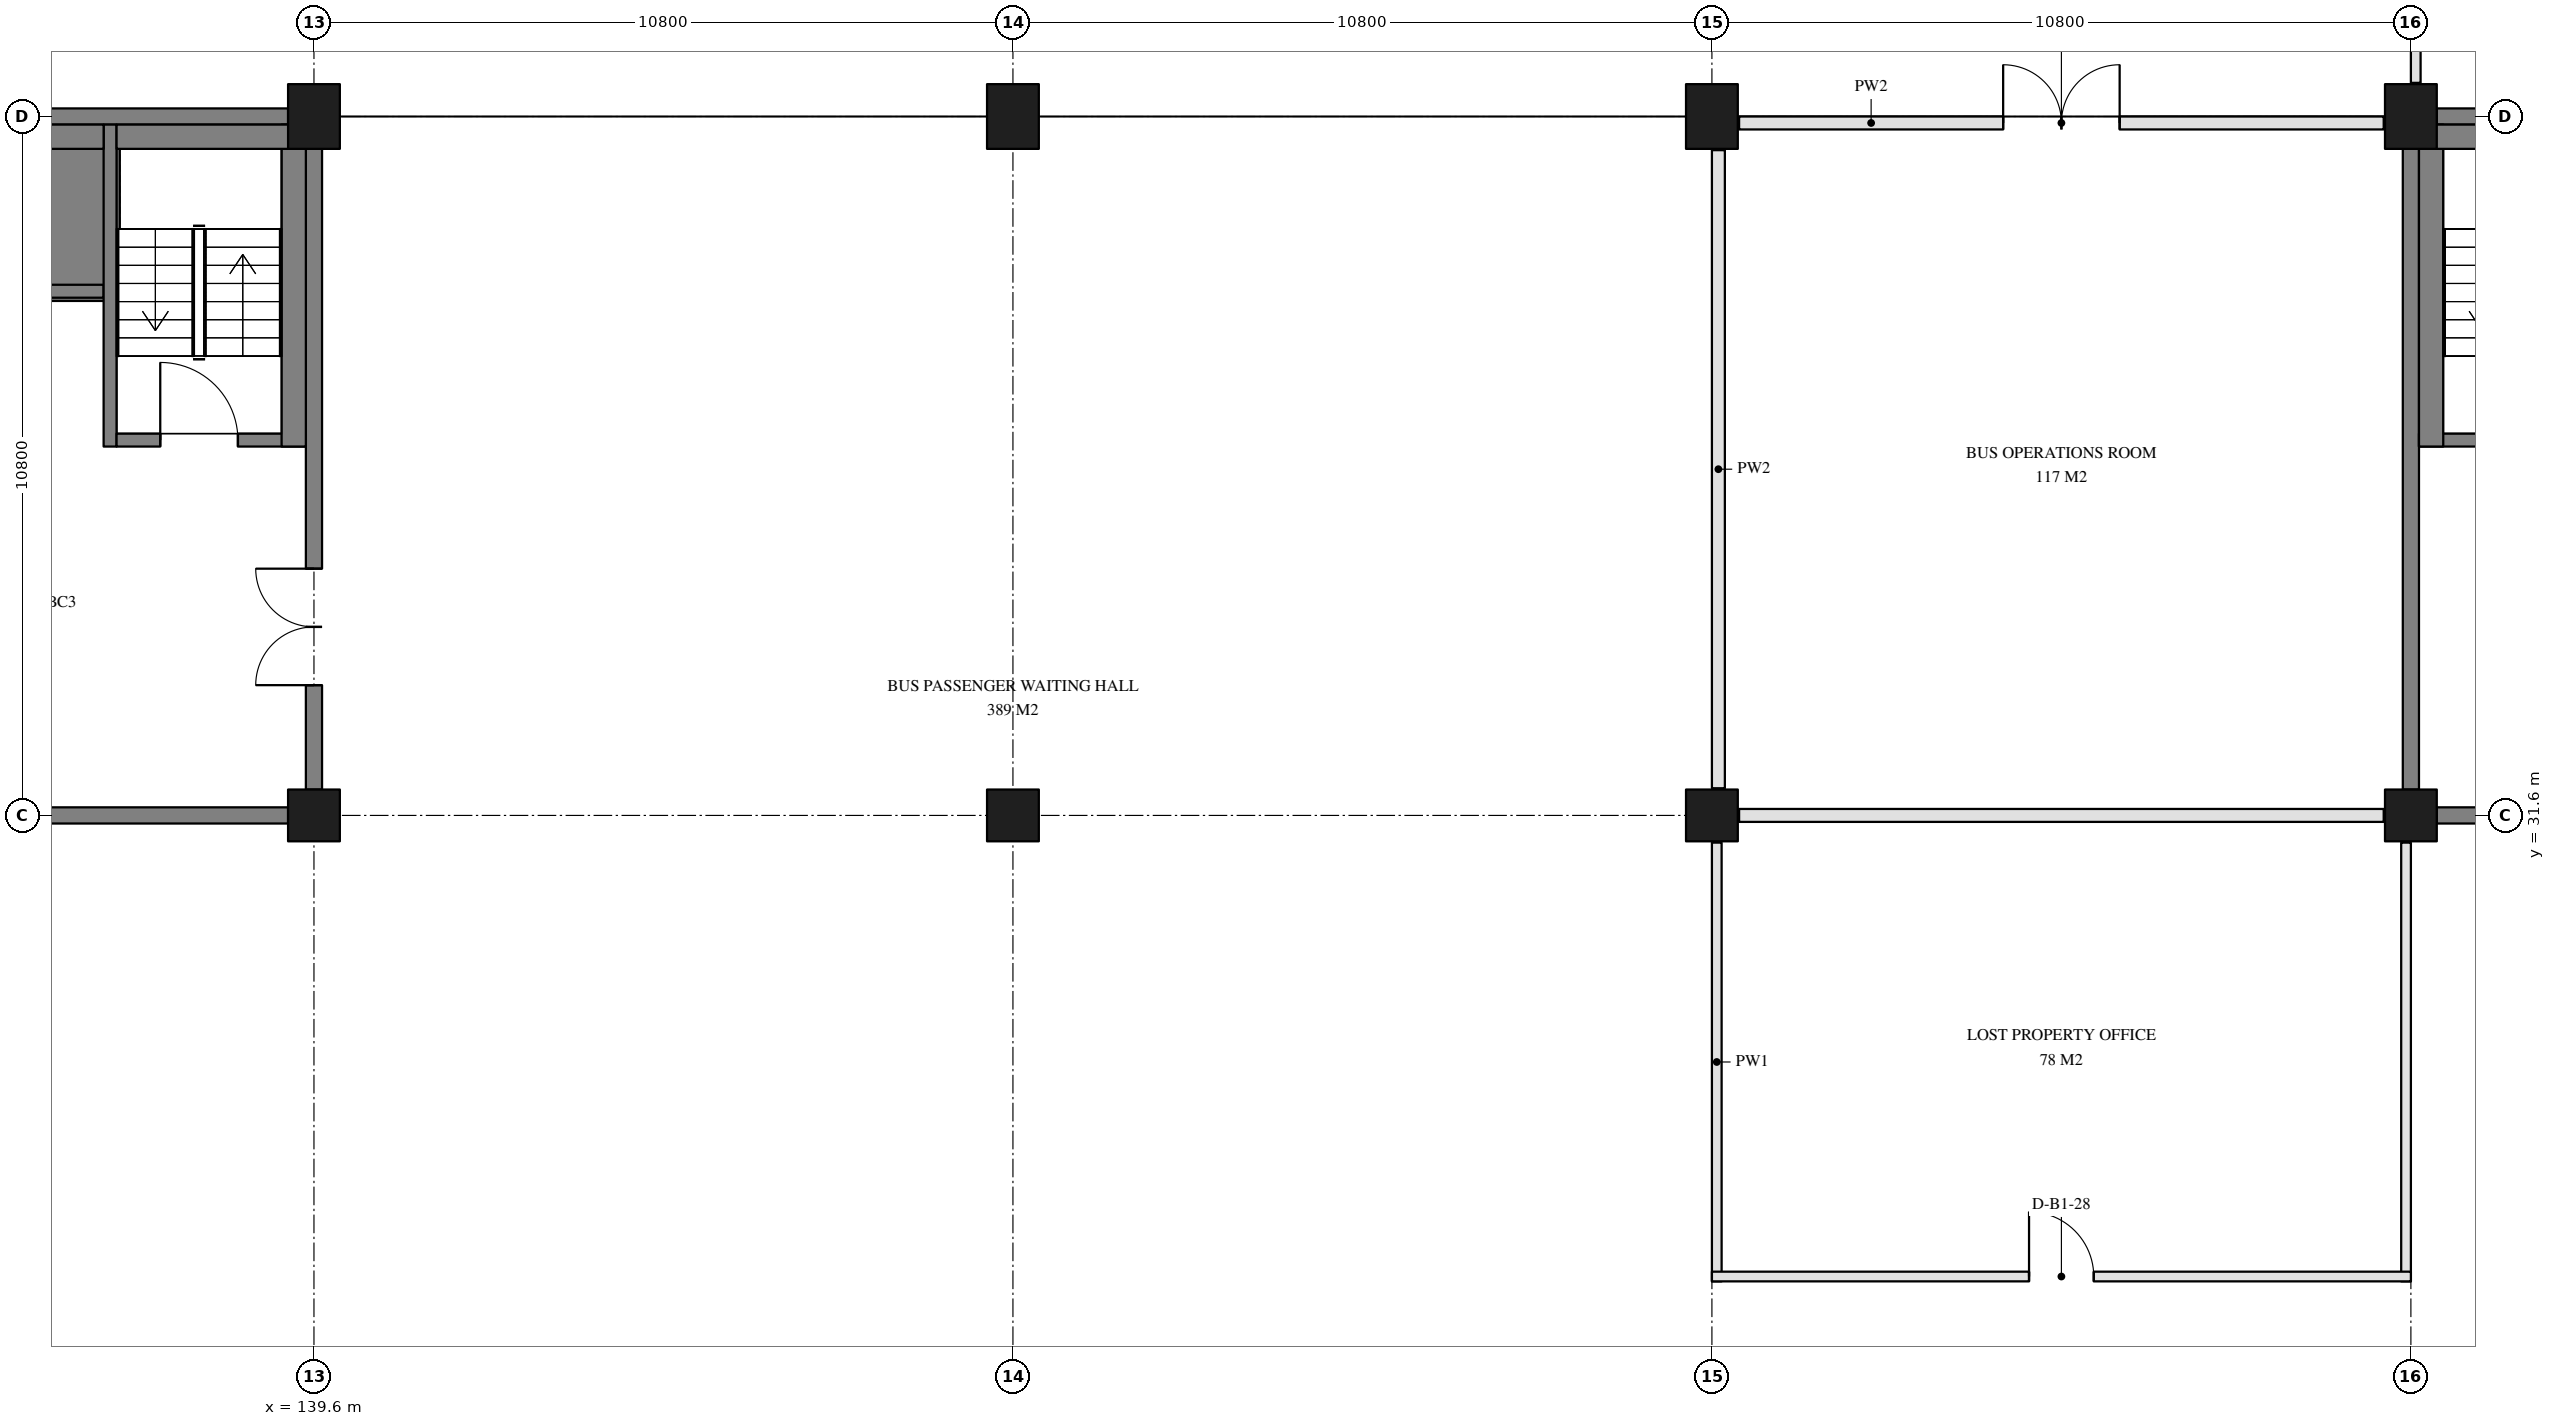
"""IFC4 building model, lengths in metres.
Left out: names, types, materials, properties, quantities, classifications, styles, units other than length and angle.
Written with IfcOpenShell. Run it as: python <this file> out.ifc"""

import sys

from ifc_helpers import new_model, si_unit, direction, frame, frame_2d, origin, origin_2d, place, context, subcontext, project, spatial, polyline, rectangle, outline, extrude, element, fill, save


model = new_model("IFC4")
c1 = context("Model", 3, precision=1e-05, world=origin(), true_north=direction((0.0, 1.0)))
c2 = subcontext(c1, "Body", "Model", "MODEL_VIEW")
j1 = project(units=[si_unit("LENGTHUNIT", "METRE"), si_unit("PLANEANGLEUNIT", "RADIAN")], contexts=[c1])
p1 = place(None, origin())
s1 = spatial("IfcSite", under=j1, at=p1, CompositionType="ELEMENT")
p2 = place(p1, origin())
s2 = spatial("IfcBuilding", under=s1, at=p2, CompositionType="ELEMENT")
p3 = place(p2, frame((0.0, 0.0, -5.4)))
s3 = spatial("IfcBuildingStorey", under=s2, at=p3, CompositionType="ELEMENT", Elevation=-5.4)
for number, where, z_axis, x_axis in (
    (1, (139.6, 42.4, -0.4), (0.0, 0.0, 1.0), (1.0, 0.0, 0.0)),
    (2, (150.4, 42.4, -0.4), (0.0, 0.0, 1.0), (1.0, 0.0, 0.0)),
    (3, (161.2, 42.4, -0.4), (0.0, 0.0, 1.0), (1.0, 0.0, 0.0)),
    (4, (172.0, 42.4, -0.4), (0.0, 0.0, 1.0), (1.0, 0.0, 0.0)),
):
    element("IfcColumn", number, at=place(p3, frame(where, z_axis=z_axis, x_axis=x_axis)), inside=s3, PredefinedType="COLUMN", context=c2, shape_type="SweptSolid", body=[
        extrude(rectangle(XDim=0.8, YDim=1.0, at=origin_2d()), origin(), (0.0, 0.0, 1.0), 5.8),
    ])
for number, where, z_axis, x_axis in (
    (5, (139.6, 31.6, -0.4), (0.0, 0.0, 1.0), (1.0, 0.0, 0.0)),
    (6, (150.4, 31.6, -0.4), (0.0, 0.0, 1.0), (1.0, 0.0, 0.0)),
    (7, (161.2, 31.6, -0.4), (0.0, 0.0, 1.0), (1.0, 0.0, 0.0)),
    (8, (172.0, 31.6, -0.4), (0.0, 0.0, 1.0), (1.0, 0.0, 0.0)),
):
    element("IfcColumn", number, at=place(p3, frame(where, z_axis=z_axis, x_axis=x_axis)), inside=s3, PredefinedType="COLUMN", context=c2, shape_type="SweptSolid", body=[
        extrude(rectangle(XDim=0.8, YDim=0.8, at=origin_2d()), origin(), (0.0, 0.0, 1.0), 5.8),
    ])
p4 = place(p3, frame((0.0, 0.0, -1.4)))
e9 = element("IfcWall", 9, at=p4, inside=s3, PredefinedType="SOLIDWALL", context=c2, shape_type="SweptSolid", body=[
    extrude(outline(polyline([(131.8, 39.55), (136.6, 39.55), (136.6, 42.15), (131.8, 42.15), (131.8, 39.55)]), holes=[polyline([(136.35, 39.8), (136.35, 41.9), (132.05, 41.9), (132.05, 39.8), (136.35, 39.8)])]), origin(), (0.0, 0.0, 1.0), 1.4),
])
p5 = place(p3, frame((129.2, 31.6, 0.0), z_axis=(0.0, 0.0, 1.0), x_axis=(1.0, 0.0, 0.0)))
e10 = element("IfcWall", 10, at=p5, inside=s3, PredefinedType="SOLIDWALL", context=c2, shape_type="SweptSolid", body=[
    extrude(rectangle(XDim=10.0, YDim=0.25, at=frame_2d((5.0, 0.0))), origin(), (0.0, 0.0, 1.0), 5.4),
])
p6 = place(p5, frame((4.1, 0.0, 0.0)))
e11 = element("IfcOpeningElement", 11, at=p6, cuts=e10, PredefinedType="OPENING", context=c2, shape_type="SweptSolid", body=[
    extrude(rectangle(XDim=1.8, YDim=2.1, at=frame_2d((0.9, 1.05))), frame((0.0, 0.135, 0.0), z_axis=(0.0, -1.0, 0.0), x_axis=(1.0, 0.0, 0.0)), (0.0, 0.0, 1.0), 0.27),
])
p7 = place(p3, frame((139.6, 32.0, 0.0), z_axis=(0.0, 0.0, 1.0), x_axis=(0.0, 1.0, 0.0)))
e12 = element("IfcWall", 12, at=p7, inside=s3, PredefinedType="SOLIDWALL", context=c2, shape_type="SweptSolid", body=[
    extrude(rectangle(XDim=9.9, YDim=0.25, at=frame_2d((4.95, 0.0))), origin(), (0.0, 0.0, 1.0), 5.4),
])
p8 = place(p7, frame((1.613, 0.0, 0.0)))
e13 = element("IfcOpeningElement", 13, at=p8, cuts=e12, PredefinedType="OPENING", context=c2, shape_type="SweptSolid", body=[
    extrude(rectangle(XDim=1.8, YDim=2.1, at=frame_2d((0.9, 1.05))), frame((0.0, 0.135, 0.0), z_axis=(0.0, -1.0, 0.0), x_axis=(1.0, 0.0, 0.0)), (0.0, 0.0, 1.0), 0.27),
])
p9 = place(p3, frame((139.2, 42.4, 0.0), z_axis=(0.0, 0.0, 1.0), x_axis=(-1.0, 0.0, 0.0)))
e14 = element("IfcWall", 14, at=p9, inside=s3, PredefinedType="SOLIDWALL", context=c2, shape_type="SweptSolid", body=[
    extrude(rectangle(XDim=10.0, YDim=0.25, at=frame_2d((5.0, 0.0))), origin(), (0.0, 0.0, 1.0), 5.4),
])
p10 = place(p3, frame((172.4, 31.6, 0.0), z_axis=(0.0, 0.0, 1.0), x_axis=(1.0, 0.0, 0.0)))
e15 = element("IfcWall", 15, at=p10, inside=s3, PredefinedType="SOLIDWALL", context=c2, shape_type="SweptSolid", body=[
    extrude(rectangle(XDim=10.0, YDim=0.25, at=frame_2d((5.0, 0.0))), origin(), (0.0, 0.0, 1.0), 5.4),
])
p11 = place(p10, frame((4.1, 0.0, 0.0)))
e16 = element("IfcOpeningElement", 16, at=p11, cuts=e15, PredefinedType="OPENING", context=c2, shape_type="SweptSolid", body=[
    extrude(rectangle(XDim=1.8, YDim=2.1, at=frame_2d((0.9, 1.05))), frame((0.0, 0.135, 0.0), z_axis=(0.0, -1.0, 0.0), x_axis=(1.0, 0.0, 0.0)), (0.0, 0.0, 1.0), 0.27),
])
p12 = place(p3, frame((182.4, 42.4, 0.0), z_axis=(0.0, 0.0, 1.0), x_axis=(-1.0, 0.0, 0.0)))
e17 = element("IfcWall", 17, at=p12, inside=s3, PredefinedType="SOLIDWALL", context=c2, shape_type="SweptSolid", body=[
    extrude(rectangle(XDim=10.0, YDim=0.25, at=frame_2d((5.0, 0.0))), origin(), (0.0, 0.0, 1.0), 5.4),
])
p13 = place(p3, frame((172.0, 41.9, 0.0), z_axis=(0.0, 0.0, 1.0), x_axis=(0.0, -1.0, 0.0)))
e18 = element("IfcWall", 18, at=p13, inside=s3, PredefinedType="SOLIDWALL", context=c2, shape_type="SweptSolid", body=[
    extrude(rectangle(XDim=9.9, YDim=0.25, at=frame_2d((4.95, 0.0))), origin(), (0.0, 0.0, 1.0), 5.4),
])
p14 = place(p3, frame((132.05, 39.7, 0.0), z_axis=(0.0, 0.0, 1.0), x_axis=(1.0, 0.0, 0.0)))
e19 = element("IfcWall", 19, at=p14, inside=s3, PredefinedType="SOLIDWALL", context=c2, shape_type="SweptSolid", body=[
    extrude(rectangle(XDim=4.3, YDim=0.2, at=frame_2d((2.15, 0.0))), origin(), (0.0, 0.0, 1.0), 4.8),
])
p15 = place(p14, frame((1.6, 0.0, 0.0)))
e20 = element("IfcOpeningElement", 20, at=p15, cuts=e19, PredefinedType="OPENING", context=c2, shape_type="SweptSolid", body=[
    extrude(rectangle(XDim=1.1, YDim=2.1, at=frame_2d((0.55, 1.05))), frame((0.0, 0.11, 0.0), z_axis=(0.0, -1.0, 0.0), x_axis=(1.0, 0.0, 0.0)), (0.0, 0.0, 1.0), 0.22),
])
p16 = place(p3, frame((136.45, 37.3, 0.0), z_axis=(0.0, 0.0, 1.0), x_axis=(0.0, 1.0, 0.0)))
e21 = element("IfcWall", 21, at=p16, inside=s3, PredefinedType="SOLIDWALL", context=c2, shape_type="SweptSolid", body=[
    extrude(rectangle(XDim=4.975, YDim=0.2, at=frame_2d((2.487, 0.0))), origin(), (0.0, 0.0, 1.0), 4.8),
])
p17 = place(p3, frame((136.55, 37.4, 0.0), z_axis=(0.0, 0.0, 1.0), x_axis=(1.0, 0.0, 0.0)))
e22 = element("IfcWall", 22, at=p17, inside=s3, PredefinedType="SOLIDWALL", context=c2, shape_type="SweptSolid", body=[
    extrude(rectangle(XDim=2.925, YDim=0.2, at=frame_2d((1.462, 0.0))), origin(), (0.0, 0.0, 1.0), 4.8),
])
p18 = place(p17, frame((0.675, 0.0, 0.0)))
e23 = element("IfcOpeningElement", 23, at=p18, cuts=e22, PredefinedType="OPENING", context=c2, shape_type="SweptSolid", body=[
    extrude(rectangle(XDim=1.2, YDim=2.1, at=frame_2d((0.6, 1.05))), frame((0.0, 0.11, 0.0), z_axis=(0.0, -1.0, 0.0), x_axis=(1.0, 0.0, 0.0)), (0.0, 0.0, 1.0), 0.22),
])
p19 = place(p3, frame((139.288, 37.3, 0.0), z_axis=(0.0, 0.0, 1.0), x_axis=(0.0, 1.0, 0.0)))
e24 = element("IfcWall", 24, at=p19, inside=s3, PredefinedType="SOLIDWALL", context=c2, shape_type="SweptSolid", body=[
    extrude(rectangle(XDim=4.975, YDim=0.375, at=frame_2d((2.487, 0.0))), origin(), (0.0, 0.0, 1.0), 4.8),
])
p20 = place(p3, frame((136.55, 42.087, 0.0), z_axis=(0.0, 0.0, 1.0), x_axis=(1.0, 0.0, 0.0)))
e25 = element("IfcWall", 25, at=p20, inside=s3, PredefinedType="SOLIDWALL", context=c2, shape_type="SweptSolid", body=[
    extrude(rectangle(XDim=2.925, YDim=0.375, at=frame_2d((1.462, 0.0))), origin(), (0.0, 0.0, 1.0), 4.8),
])
p21 = place(p3, frame((132.05, 42.087, 0.0), z_axis=(0.0, 0.0, 1.0), x_axis=(1.0, 0.0, 0.0)))
e26 = element("IfcWall", 26, at=p21, inside=s3, PredefinedType="SOLIDWALL", context=c2, shape_type="SweptSolid", body=[
    extrude(rectangle(XDim=4.3, YDim=0.375, at=frame_2d((2.15, 0.0))), origin(), (0.0, 0.0, 1.0), 4.8),
])
p22 = place(p3, frame((172.125, 37.4, 0.0), z_axis=(0.0, 0.0, 1.0), x_axis=(1.0, 0.0, 0.0)))
e27 = element("IfcWall", 27, at=p22, inside=s3, PredefinedType="SOLIDWALL", context=c2, shape_type="SweptSolid", body=[
    extrude(rectangle(XDim=2.925, YDim=0.2, at=frame_2d((1.462, 0.0))), origin(), (0.0, 0.0, 1.0), 4.8),
])
p23 = place(p22, frame((1.05, 0.0, 0.0)))
e28 = element("IfcOpeningElement", 28, at=p23, cuts=e27, PredefinedType="OPENING", context=c2, shape_type="SweptSolid", body=[
    extrude(rectangle(XDim=1.2, YDim=2.1, at=frame_2d((0.6, 1.05))), frame((0.0, 0.11, 0.0), z_axis=(0.0, -1.0, 0.0), x_axis=(1.0, 0.0, 0.0)), (0.0, 0.0, 1.0), 0.22),
])
p24 = place(p3, frame((172.312, 37.3, 0.0), z_axis=(0.0, 0.0, 1.0), x_axis=(0.0, 1.0, 0.0)))
e29 = element("IfcWall", 29, at=p24, inside=s3, PredefinedType="SOLIDWALL", context=c2, shape_type="SweptSolid", body=[
    extrude(rectangle(XDim=4.975, YDim=0.375, at=frame_2d((2.487, 0.0))), origin(), (0.0, 0.0, 1.0), 4.8),
])
p25 = place(p3, frame((172.125, 42.087, 0.0), z_axis=(0.0, 0.0, 1.0), x_axis=(1.0, 0.0, 0.0)))
e30 = element("IfcWall", 30, at=p25, inside=s3, PredefinedType="SOLIDWALL", context=c2, shape_type="SweptSolid", body=[
    extrude(rectangle(XDim=2.925, YDim=0.375, at=frame_2d((1.462, 0.0))), origin(), (0.0, 0.0, 1.0), 4.8),
])
p26 = place(p3, frame((172.075, 42.92, 0.0), z_axis=(0.0, 0.0, 1.0), x_axis=(0.0, 1.0, 0.0)))
e31 = element("IfcWall", 31, at=p26, inside=s3, PredefinedType="PARTITIONING", context=c2, shape_type="SweptSolid", body=[
    extrude(rectangle(XDim=9.76, YDim=0.15, at=frame_2d((4.88, 0.0))), origin(), (0.0, 0.0, 1.0), 3.8),
])
p27 = place(p26, frame((3.98, 0.0, 0.0)))
e32 = element("IfcOpeningElement", 32, at=p27, cuts=e31, PredefinedType="OPENING", context=c2, shape_type="SweptSolid", body=[
    extrude(rectangle(XDim=1.8, YDim=2.1, at=frame_2d((0.9, 1.05))), frame((0.0, 0.085, 0.0), z_axis=(0.0, -1.0, 0.0), x_axis=(1.0, 0.0, 0.0)), (0.0, 0.0, 1.0), 0.17),
])
p28 = place(p3, frame((161.62, 42.3, 0.0), z_axis=(0.0, 0.0, 1.0), x_axis=(1.0, 0.0, 0.0)))
e33 = element("IfcWall", 33, at=p28, inside=s3, PredefinedType="PARTITIONING", context=c2, shape_type="SweptSolid", body=[
    extrude(rectangle(XDim=9.96, YDim=0.2, at=frame_2d((4.98, 0.0))), origin(), (0.0, 0.0, 1.0), 3.8),
])
p29 = place(p28, frame((4.08, 0.0, 0.0)))
e34 = element("IfcOpeningElement", 34, at=p29, cuts=e33, PredefinedType="OPENING", context=c2, shape_type="SweptSolid", body=[
    extrude(rectangle(XDim=1.8, YDim=2.1, at=frame_2d((0.9, 1.05))), frame((0.0, 0.11, 0.0), z_axis=(0.0, -1.0, 0.0), x_axis=(1.0, 0.0, 0.0)), (0.0, 0.0, 1.0), 0.22),
])
p30 = place(p3, frame((161.275, 24.4, 0.0), z_axis=(0.0, 0.0, 1.0), x_axis=(0.0, 1.0, 0.0)))
e35 = element("IfcWall", 35, at=p30, inside=s3, PredefinedType="PARTITIONING", context=c2, shape_type="SweptSolid", body=[
    extrude(rectangle(XDim=6.78, YDim=0.15, at=frame_2d((3.39, 0.0))), origin(), (0.0, 0.0, 1.0), 3.8),
])
p31 = place(p3, frame((161.3, 32.02, 0.0), z_axis=(0.0, 0.0, 1.0), x_axis=(0.0, 1.0, 0.0)))
e36 = element("IfcWall", 36, at=p31, inside=s3, PredefinedType="PARTITIONING", context=c2, shape_type="SweptSolid", body=[
    extrude(rectangle(XDim=9.86, YDim=0.2, at=frame_2d((4.93, 0.0))), origin(), (0.0, 0.0, 1.0), 3.8),
])
p32 = place(p3, frame((161.62, 31.6, 0.0), z_axis=(0.0, 0.0, 1.0), x_axis=(1.0, 0.0, 0.0)))
e37 = element("IfcWall", 37, at=p32, inside=s3, PredefinedType="PARTITIONING", context=c2, shape_type="SweptSolid", body=[
    extrude(rectangle(XDim=9.96, YDim=0.2, at=frame_2d((4.98, 0.0))), origin(), (0.0, 0.0, 1.0), 3.8),
])
p33 = place(p3, frame((171.925, 24.4, 0.0), z_axis=(0.0, 0.0, 1.0), x_axis=(0.0, 1.0, 0.0)))
e38 = element("IfcWall", 38, at=p33, inside=s3, PredefinedType="PARTITIONING", context=c2, shape_type="SweptSolid", body=[
    extrude(rectangle(XDim=6.78, YDim=0.15, at=frame_2d((3.39, 0.0))), origin(), (0.0, 0.0, 1.0), 3.8),
])
p34 = place(p3, frame((161.2, 24.475, 0.0), z_axis=(0.0, 0.0, 1.0), x_axis=(1.0, 0.0, 0.0)))
e39 = element("IfcWall", 39, at=p34, inside=s3, PredefinedType="PARTITIONING", context=c2, shape_type="SweptSolid", body=[
    extrude(rectangle(XDim=10.8, YDim=0.15, at=frame_2d((5.4, 0.0))), origin(), (0.0, 0.0, 1.0), 3.8),
])
p35 = place(p34, frame((4.9, 0.0, 0.0)))
e40 = element("IfcOpeningElement", 40, at=p35, cuts=e39, PredefinedType="OPENING", context=c2, shape_type="SweptSolid", body=[
    extrude(rectangle(XDim=1.0, YDim=2.1, at=frame_2d((0.5, 1.05))), frame((0.0, 0.085, 0.0), z_axis=(0.0, -1.0, 0.0), x_axis=(1.0, 0.0, 0.0)), (0.0, 0.0, 1.0), 0.17),
])
p36 = place(p18, frame((1.2, 0.0, 0.0), z_axis=(0.0, 0.0, 1.0), x_axis=(-1.0, 0.0, 0.0)))
e41 = element("IfcDoor", 41, at=p36, inside=s3, OperationType="SINGLE_SWING_RIGHT", PredefinedType="DOOR", context=c2, shape_type="SweptSolid", body=[
    extrude(rectangle(XDim=1.2, YDim=2.1, at=frame_2d((0.6, 1.05))), frame((0.0, 0.025, 0.0), z_axis=(0.0, -1.0, 0.0), x_axis=(1.0, 0.0, 0.0)), (0.0, 0.0, 1.0), 0.05),
])
fill(e23, e41)
p37 = place(p8, frame((1.8, 0.0, 0.0), z_axis=(0.0, 0.0, 1.0), x_axis=(-1.0, 0.0, 0.0)))
e42 = element("IfcDoor", 42, at=p37, inside=s3, OperationType="DOUBLE_DOOR_DOUBLE_SWING", PredefinedType="DOOR", context=c2, shape_type="SweptSolid", body=[
    extrude(rectangle(XDim=1.8, YDim=2.1, at=frame_2d((0.9, 1.05))), frame((0.0, 0.025, 0.0), z_axis=(0.0, -1.0, 0.0), x_axis=(1.0, 0.0, 0.0)), (0.0, 0.0, 1.0), 0.05),
])
fill(e13, e42)
p38 = place(p29, frame((1.8, 0.0, 0.0), z_axis=(0.0, 0.0, 1.0), x_axis=(-1.0, 0.0, 0.0)))
e43 = element("IfcDoor", 43, at=p38, inside=s3, OperationType="DOUBLE_DOOR_DOUBLE_SWING", PredefinedType="DOOR", context=c2, shape_type="SweptSolid", body=[
    extrude(rectangle(XDim=1.8, YDim=2.1, at=frame_2d((0.9, 1.05))), frame((0.0, 0.025, 0.0), z_axis=(0.0, -1.0, 0.0), x_axis=(1.0, 0.0, 0.0)), (0.0, 0.0, 1.0), 0.05),
])
fill(e34, e43)
p39 = place(p35, origin())
e44 = element("IfcDoor", 44, at=p39, inside=s3, OperationType="SINGLE_SWING_LEFT", PredefinedType="DOOR", context=c2, shape_type="SweptSolid", body=[
    extrude(rectangle(XDim=1.0, YDim=2.1, at=frame_2d((0.5, 1.05))), frame((0.0, 0.025, 0.0), z_axis=(0.0, -1.0, 0.0), x_axis=(1.0, 0.0, 0.0)), (0.0, 0.0, 1.0), 0.05),
])
fill(e40, e44)
save(model, sys.argv[1])
